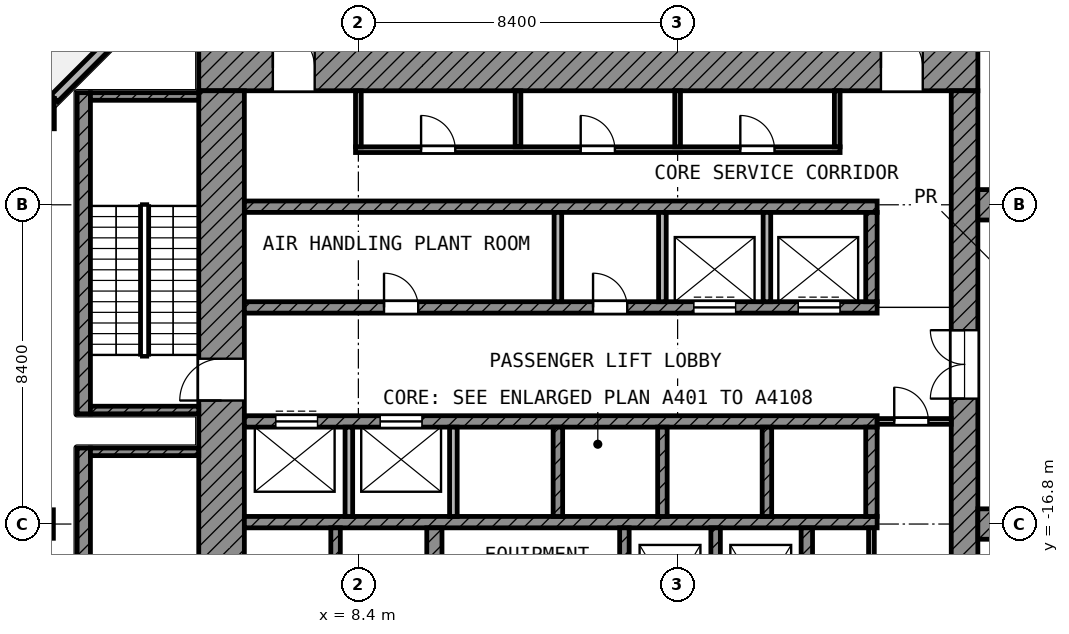
"""IFC4 building model, lengths in metres.
Left out: names, types, materials, properties, quantities, classifications, styles, units other than length and angle.
Written with IfcOpenShell. Run it as: python <this file> out.ifc"""

import sys

from ifc_helpers import new_model, si_unit, direction, frame, frame_2d, origin, origin_2d, place, context, subcontext, project, spatial, rectangle, extrude, element, fill, save


model = new_model("IFC4")
c1 = context("Model", 3, precision=1e-05, world=origin(), true_north=direction((0.0, 1.0)))
c2 = subcontext(c1, "Body", "Model", "MODEL_VIEW")
j1 = project(units=[si_unit("LENGTHUNIT", "METRE"), si_unit("PLANEANGLEUNIT", "RADIAN")], contexts=[c1])
p1 = place(None, origin())
s1 = spatial("IfcSite", under=j1, at=p1, CompositionType="ELEMENT")
p2 = place(p1, origin())
s2 = spatial("IfcBuilding", under=s1, at=p2, CompositionType="ELEMENT")
p3 = place(p2, frame((0.0, 0.0, 272.6)))
s3 = spatial("IfcBuildingStorey", under=s2, at=p3, CompositionType="ELEMENT", Elevation=272.6)
p4 = place(p3, frame((0.0, -6.0, 0.0), z_axis=(0.0, 0.0, 1.0), x_axis=(1.0, 0.0, 0.0)))
e1 = element("IfcColumn", 1, at=p4, inside=s3, PredefinedType="COLUMN", context=c2, shape_type="SweptSolid", body=[
    extrude(rectangle(XDim=0.8, YDim=0.8, at=origin_2d()), origin(), (0.0, 0.0, 1.0), 5.0),
])
p5 = place(p3, frame((0.0, -16.8, 0.0), z_axis=(0.0, 0.0, 1.0), x_axis=(1.0, 0.0, 0.0)))
e2 = element("IfcColumn", 2, at=p5, inside=s3, PredefinedType="COLUMN", context=c2, shape_type="SweptSolid", body=[
    extrude(rectangle(XDim=0.75, YDim=0.75, at=origin_2d()), origin(), (0.0, 0.0, 1.0), 5.0),
])
for number, where, z_axis, x_axis in (
    (3, (24.7, -8.4, 0.0), (0.0, 0.0, 1.0), (1.0, 0.0, 0.0)),
    (4, (24.7, -16.8, 0.0), (0.0, 0.0, 1.0), (1.0, 0.0, 0.0)),
):
    element("IfcWall", number, at=place(p3, frame(where, z_axis=z_axis, x_axis=x_axis)), inside=s3, PredefinedType="SHEAR", context=c2, shape_type="SweptSolid", body=[
        extrude(rectangle(XDim=8.5, YDim=0.8, at=frame_2d((4.25, 0.0))), origin(), (0.0, 0.0, 1.0), 4.4),
    ])
p6 = place(p3, frame((5.6, -0.4, 0.0), z_axis=(0.0, 0.0, 1.0), x_axis=(-0.707106781187, -0.707106781187, 0.0)))
e5 = element("IfcWall", 5, at=p6, inside=s3, PredefinedType="SOLIDWALL", context=c2, shape_type="SweptSolid", body=[
    extrude(rectangle(XDim=7.354, YDim=0.25, at=frame_2d((3.677, 0.0))), origin(), (0.0, 0.0, 1.0), 3.3),
])
p7 = place(p3, frame((4.2, -4.8, 0.0), z_axis=(0.0, 0.0, 1.0), x_axis=(1.0, 0.0, 0.0)))
e6 = element("IfcWall", 6, at=p7, inside=s3, PredefinedType="SHEAR", context=c2, shape_type="SweptSolid", body=[
    extrude(rectangle(XDim=20.5, YDim=1.2, at=frame_2d((10.25, 0.0))), origin(), (0.0, 0.0, 1.0), 4.4),
])
p8 = place(p7, frame((1.95, 0.0, 0.0)))
e7 = element("IfcOpeningElement", 7, at=p8, cuts=e6, PredefinedType="OPENING", context=c2, shape_type="SweptSolid", body=[
    extrude(rectangle(XDim=1.1, YDim=2.1, at=frame_2d((0.55, 1.05))), frame((0.0, 0.61, 0.0), z_axis=(0.0, -1.0, 0.0), x_axis=(1.0, 0.0, 0.0)), (0.0, 0.0, 1.0), 1.22),
])
p9 = place(p7, frame((17.95, 0.0, 0.0)))
e8 = element("IfcOpeningElement", 8, at=p9, cuts=e6, PredefinedType="OPENING", context=c2, shape_type="SweptSolid", body=[
    extrude(rectangle(XDim=1.1, YDim=2.1, at=frame_2d((0.55, 1.05))), frame((0.0, 0.61, 0.0), z_axis=(0.0, -1.0, 0.0), x_axis=(1.0, 0.0, 0.0)), (0.0, 0.0, 1.0), 1.22),
])
p10 = place(p3, frame((4.8, -24.7, 0.0), z_axis=(0.0, 0.0, 1.0), x_axis=(0.0, 1.0, 0.0)))
e9 = element("IfcWall", 9, at=p10, inside=s3, PredefinedType="SHEAR", context=c2, shape_type="SweptSolid", body=[
    extrude(rectangle(XDim=19.3, YDim=1.2, at=frame_2d((9.65, 0.0))), origin(), (0.0, 0.0, 1.0), 4.4),
])
p11 = place(p10, frame((11.15, 0.0, 0.0)))
e10 = element("IfcOpeningElement", 10, at=p11, cuts=e9, PredefinedType="OPENING", context=c2, shape_type="SweptSolid", body=[
    extrude(rectangle(XDim=1.1, YDim=2.1, at=frame_2d((0.55, 1.05))), frame((0.0, 0.61, 0.0), z_axis=(0.0, -1.0, 0.0), x_axis=(1.0, 0.0, 0.0)), (0.0, 0.0, 1.0), 1.22),
])
p12 = place(p10, frame((1.85, 0.0, 0.0)))
e11 = element("IfcOpeningElement", 11, at=p12, cuts=e9, PredefinedType="OPENING", context=c2, shape_type="SweptSolid", body=[
    extrude(rectangle(XDim=1.1, YDim=2.1, at=frame_2d((0.55, 1.05))), frame((0.0, 0.61, 0.0), z_axis=(0.0, -1.0, 0.0), x_axis=(1.0, 0.0, 0.0)), (0.0, 0.0, 1.0), 1.22),
])
p13 = place(p3, frame((24.35, -24.0, 0.0), z_axis=(0.0, 0.0, 1.0), x_axis=(0.0, 1.0, 0.0)))
e12 = element("IfcWall", 12, at=p13, inside=s3, PredefinedType="SHEAR", context=c2, shape_type="SweptSolid", body=[
    extrude(rectangle(XDim=18.6, YDim=0.7, at=frame_2d((9.3, 0.0))), origin(), (0.0, 0.0, 1.0), 4.4),
])
p14 = place(p13, frame((10.5, 0.0, 0.0)))
e13 = element("IfcOpeningElement", 13, at=p14, cuts=e12, PredefinedType="OPENING", context=c2, shape_type="SweptSolid", body=[
    extrude(rectangle(XDim=1.8, YDim=2.1, at=frame_2d((0.9, 1.05))), frame((0.0, 0.36, 0.0), z_axis=(0.0, -1.0, 0.0), x_axis=(1.0, 0.0, 0.0)), (0.0, 0.0, 1.0), 0.72),
])
p15 = place(p3, frame((5.4, -8.45, 0.0), z_axis=(0.0, 0.0, 1.0), x_axis=(1.0, 0.0, 0.0)))
e14 = element("IfcWall", 14, at=p15, inside=s3, PredefinedType="SHEAR", context=c2, shape_type="SweptSolid", body=[
    extrude(rectangle(XDim=16.65, YDim=0.3, at=frame_2d((8.325, 0.0))), origin(), (0.0, 0.0, 1.0), 4.4),
])
p16 = place(p3, frame((5.4, -11.1, 0.0), z_axis=(0.0, 0.0, 1.0), x_axis=(1.0, 0.0, 0.0)))
e15 = element("IfcWall", 15, at=p16, inside=s3, PredefinedType="SHEAR", context=c2, shape_type="SweptSolid", body=[
    extrude(rectangle(XDim=16.65, YDim=0.3, at=frame_2d((8.325, 0.0))), origin(), (0.0, 0.0, 1.0), 4.4),
])
p17 = place(p16, frame((11.825, 0.0, 0.0)))
e16 = element("IfcOpeningElement", 16, at=p17, cuts=e15, PredefinedType="OPENING", context=c2, shape_type="SweptSolid", body=[
    extrude(rectangle(XDim=1.1, YDim=2.1, at=frame_2d((0.55, 1.05))), frame((0.0, 0.16, 0.0), z_axis=(0.0, -1.0, 0.0), x_axis=(1.0, 0.0, 0.0)), (0.0, 0.0, 1.0), 0.32),
])
p18 = place(p16, frame((14.575, 0.0, 0.0)))
e17 = element("IfcOpeningElement", 17, at=p18, cuts=e15, PredefinedType="OPENING", context=c2, shape_type="SweptSolid", body=[
    extrude(rectangle(XDim=1.1, YDim=2.1, at=frame_2d((0.55, 1.05))), frame((0.0, 0.16, 0.0), z_axis=(0.0, -1.0, 0.0), x_axis=(1.0, 0.0, 0.0)), (0.0, 0.0, 1.0), 0.32),
])
p19 = place(p16, frame((3.675, 0.0, 0.0)))
e18 = element("IfcOpeningElement", 18, at=p19, cuts=e15, PredefinedType="OPENING", context=c2, shape_type="SweptSolid", body=[
    extrude(rectangle(XDim=0.9, YDim=2.1, at=frame_2d((0.45, 1.05))), frame((0.0, 0.16, 0.0), z_axis=(0.0, -1.0, 0.0), x_axis=(1.0, 0.0, 0.0)), (0.0, 0.0, 1.0), 0.32),
])
p20 = place(p16, frame((9.175, 0.0, 0.0)))
e19 = element("IfcOpeningElement", 19, at=p20, cuts=e15, PredefinedType="OPENING", context=c2, shape_type="SweptSolid", body=[
    extrude(rectangle(XDim=0.9, YDim=2.1, at=frame_2d((0.45, 1.05))), frame((0.0, 0.16, 0.0), z_axis=(0.0, -1.0, 0.0), x_axis=(1.0, 0.0, 0.0)), (0.0, 0.0, 1.0), 0.32),
])
p21 = place(p3, frame((5.4, -14.1, 0.0), z_axis=(0.0, 0.0, 1.0), x_axis=(1.0, 0.0, 0.0)))
e20 = element("IfcWall", 20, at=p21, inside=s3, PredefinedType="SHEAR", context=c2, shape_type="SweptSolid", body=[
    extrude(rectangle(XDim=16.65, YDim=0.3, at=frame_2d((8.325, 0.0))), origin(), (0.0, 0.0, 1.0), 4.4),
])
p22 = place(p21, frame((0.825, 0.0, 0.0)))
e21 = element("IfcOpeningElement", 21, at=p22, cuts=e20, PredefinedType="OPENING", context=c2, shape_type="SweptSolid", body=[
    extrude(rectangle(XDim=1.1, YDim=2.1, at=frame_2d((0.55, 1.05))), frame((0.0, 0.16, 0.0), z_axis=(0.0, -1.0, 0.0), x_axis=(1.0, 0.0, 0.0)), (0.0, 0.0, 1.0), 0.32),
])
p23 = place(p21, frame((3.575, 0.0, 0.0)))
e22 = element("IfcOpeningElement", 22, at=p23, cuts=e20, PredefinedType="OPENING", context=c2, shape_type="SweptSolid", body=[
    extrude(rectangle(XDim=1.1, YDim=2.1, at=frame_2d((0.55, 1.05))), frame((0.0, 0.16, 0.0), z_axis=(0.0, -1.0, 0.0), x_axis=(1.0, 0.0, 0.0)), (0.0, 0.0, 1.0), 0.32),
])
p24 = place(p3, frame((5.4, -16.75, 0.0), z_axis=(0.0, 0.0, 1.0), x_axis=(1.0, 0.0, 0.0)))
e23 = element("IfcWall", 23, at=p24, inside=s3, PredefinedType="SHEAR", context=c2, shape_type="SweptSolid", body=[
    extrude(rectangle(XDim=16.65, YDim=0.3, at=frame_2d((8.325, 0.0))), origin(), (0.0, 0.0, 1.0), 4.4),
])
p25 = place(p3, frame((10.4, -20.05, 0.0), z_axis=(0.0, 0.0, 1.0), x_axis=(0.0, 1.0, 0.0)))
e24 = element("IfcWall", 24, at=p25, inside=s3, PredefinedType="SHEAR", context=c2, shape_type="SweptSolid", body=[
    extrude(rectangle(XDim=3.15, YDim=0.4, at=frame_2d((1.575, 0.0))), origin(), (0.0, 0.0, 1.0), 4.4),
])
p26 = place(p3, frame((20.2, -20.35, 0.0), z_axis=(0.0, 0.0, 1.0), x_axis=(0.0, 1.0, 0.0)))
e25 = element("IfcWall", 25, at=p26, inside=s3, PredefinedType="SHEAR", context=c2, shape_type="SweptSolid", body=[
    extrude(rectangle(XDim=3.45, YDim=0.3, at=frame_2d((1.725, 0.0))), origin(), (0.0, 0.0, 1.0), 4.4),
])
p27 = place(p3, frame((21.9, -10.95, 0.0), z_axis=(0.0, 0.0, 1.0), x_axis=(0.0, 1.0, 0.0)))
e26 = element("IfcWall", 26, at=p27, inside=s3, PredefinedType="SHEAR", context=c2, shape_type="SweptSolid", body=[
    extrude(rectangle(XDim=2.35, YDim=0.3, at=frame_2d((1.175, 0.0))), origin(), (0.0, 0.0, 1.0), 4.4),
])
p28 = place(p3, frame((21.9, -16.6, 0.0), z_axis=(0.0, 0.0, 1.0), x_axis=(0.0, 1.0, 0.0)))
e27 = element("IfcWall", 27, at=p28, inside=s3, PredefinedType="SHEAR", context=c2, shape_type="SweptSolid", body=[
    extrude(rectangle(XDim=2.35, YDim=0.3, at=frame_2d((1.175, 0.0))), origin(), (0.0, 0.0, 1.0), 4.4),
])
for number, where, z_axis, x_axis in (
    (28, (7.8, -20.05, 0.0), (0.0, 0.0, 1.0), (0.0, 1.0, 0.0)),
    (29, (15.4, -20.05, 0.0), (0.0, 0.0, 1.0), (0.0, 1.0, 0.0)),
    (30, (17.8, -20.05, 0.0), (0.0, 0.0, 1.0), (0.0, 1.0, 0.0)),
):
    element("IfcWall", number, at=place(p3, frame(where, z_axis=z_axis, x_axis=x_axis)), inside=s3, PredefinedType="SHEAR", context=c2, shape_type="SweptSolid", body=[
        extrude(rectangle(XDim=3.15, YDim=0.25, at=frame_2d((1.575, 0.0))), origin(), (0.0, 0.0, 1.0), 4.4),
    ])
for number, where, z_axis, x_axis in (
    (31, (13.65, -10.95, 0.0), (0.0, 0.0, 1.0), (0.0, 1.0, 0.0)),
    (32, (16.4, -10.95, 0.0), (0.0, 0.0, 1.0), (0.0, 1.0, 0.0)),
    (33, (19.15, -10.95, 0.0), (0.0, 0.0, 1.0), (0.0, 1.0, 0.0)),
):
    element("IfcWall", number, at=place(p3, frame(where, z_axis=z_axis, x_axis=x_axis)), inside=s3, PredefinedType="PARTITIONING", context=c2, shape_type="SweptSolid", body=[
        extrude(rectangle(XDim=2.35, YDim=0.2, at=frame_2d((1.175, 0.0))), origin(), (0.0, 0.0, 1.0), 4.4),
    ])
for number, where, z_axis, x_axis in (
    (34, (8.15, -16.6, 0.0), (0.0, 0.0, 1.0), (0.0, 1.0, 0.0)),
    (35, (10.9, -16.6, 0.0), (0.0, 0.0, 1.0), (0.0, 1.0, 0.0)),
):
    element("IfcWall", number, at=place(p3, frame(where, z_axis=z_axis, x_axis=x_axis)), inside=s3, PredefinedType="PARTITIONING", context=c2, shape_type="SweptSolid", body=[
        extrude(rectangle(XDim=2.35, YDim=0.2, at=frame_2d((1.175, 0.0))), origin(), (0.0, 0.0, 1.0), 4.4),
    ])
for number, where, z_axis, x_axis in (
    (36, (13.65, -16.6, 0.0), (0.0, 0.0, 1.0), (0.0, 1.0, 0.0)),
    (37, (16.4, -16.6, 0.0), (0.0, 0.0, 1.0), (0.0, 1.0, 0.0)),
    (38, (19.15, -16.6, 0.0), (0.0, 0.0, 1.0), (0.0, 1.0, 0.0)),
):
    element("IfcWall", number, at=place(p3, frame(where, z_axis=z_axis, x_axis=x_axis)), inside=s3, PredefinedType="SHEAR", context=c2, shape_type="SweptSolid", body=[
        extrude(rectangle(XDim=2.35, YDim=0.25, at=frame_2d((1.175, 0.0))), origin(), (0.0, 0.0, 1.0), 4.4),
    ])
p29 = place(p3, frame((21.9, -19.05, 0.0), z_axis=(0.0, 0.0, 1.0), x_axis=(0.0, 1.0, 0.0)))
e39 = element("IfcWall", 39, at=p29, inside=s3, PredefinedType="PARTITIONING", context=c2, shape_type="SweptSolid", body=[
    extrude(rectangle(XDim=2.15, YDim=0.15, at=frame_2d((1.075, 0.0))), origin(), (0.0, 0.0, 1.0), 4.4),
])
p30 = place(p3, frame((22.05, -14.1, 0.0), z_axis=(0.0, 0.0, 1.0), x_axis=(1.0, 0.0, 0.0)))
e40 = element("IfcWall", 40, at=p30, inside=s3, PredefinedType="PARTITIONING", context=c2, shape_type="SweptSolid", body=[
    extrude(rectangle(XDim=1.95, YDim=0.15, at=frame_2d((0.975, 0.0))), origin(), (0.0, 0.0, 1.0), 4.4),
])
p31 = place(p30, frame((0.45, 0.0, 0.0)))
e41 = element("IfcOpeningElement", 41, at=p31, cuts=e40, PredefinedType="OPENING", context=c2, shape_type="SweptSolid", body=[
    extrude(rectangle(XDim=0.9, YDim=2.1, at=frame_2d((0.45, 1.05))), frame((0.0, 0.085, 0.0), z_axis=(0.0, -1.0, 0.0), x_axis=(1.0, 0.0, 0.0)), (0.0, 0.0, 1.0), 0.17),
])
p32 = place(p3, frame((8.325, -6.95, 0.0), z_axis=(0.0, 0.0, 1.0), x_axis=(1.0, 0.0, 0.0)))
e42 = element("IfcWall", 42, at=p32, inside=s3, PredefinedType="PARTITIONING", context=c2, shape_type="SweptSolid", body=[
    extrude(rectangle(XDim=12.75, YDim=0.15, at=frame_2d((6.375, 0.0))), origin(), (0.0, 0.0, 1.0), 4.4),
])
p33 = place(p32, frame((1.725, 0.0, 0.0)))
e43 = element("IfcOpeningElement", 43, at=p33, cuts=e42, PredefinedType="OPENING", context=c2, shape_type="SweptSolid", body=[
    extrude(rectangle(XDim=0.9, YDim=2.1, at=frame_2d((0.45, 1.05))), frame((0.0, 0.085, 0.0), z_axis=(0.0, -1.0, 0.0), x_axis=(1.0, 0.0, 0.0)), (0.0, 0.0, 1.0), 0.17),
])
p34 = place(p32, frame((5.925, 0.0, 0.0)))
e44 = element("IfcOpeningElement", 44, at=p34, cuts=e42, PredefinedType="OPENING", context=c2, shape_type="SweptSolid", body=[
    extrude(rectangle(XDim=0.9, YDim=2.1, at=frame_2d((0.45, 1.05))), frame((0.0, 0.085, 0.0), z_axis=(0.0, -1.0, 0.0), x_axis=(1.0, 0.0, 0.0)), (0.0, 0.0, 1.0), 0.17),
])
p35 = place(p32, frame((10.125, 0.0, 0.0)))
e45 = element("IfcOpeningElement", 45, at=p35, cuts=e42, PredefinedType="OPENING", context=c2, shape_type="SweptSolid", body=[
    extrude(rectangle(XDim=0.9, YDim=2.1, at=frame_2d((0.45, 1.05))), frame((0.0, 0.085, 0.0), z_axis=(0.0, -1.0, 0.0), x_axis=(1.0, 0.0, 0.0)), (0.0, 0.0, 1.0), 0.17),
])
for number, where, z_axis, x_axis in (
    (46, (8.4, -6.875, 0.0), (0.0, 0.0, 1.0), (0.0, 1.0, 0.0)),
    (47, (12.6, -6.875, 0.0), (0.0, 0.0, 1.0), (0.0, 1.0, 0.0)),
    (48, (16.8, -6.875, 0.0), (0.0, 0.0, 1.0), (0.0, 1.0, 0.0)),
    (49, (21.0, -6.875, 0.0), (0.0, 0.0, 1.0), (0.0, 1.0, 0.0)),
):
    element("IfcWall", number, at=place(p3, frame(where, z_axis=z_axis, x_axis=x_axis)), inside=s3, PredefinedType="PARTITIONING", context=c2, shape_type="SweptSolid", body=[
        extrude(rectangle(XDim=1.475, YDim=0.15, at=frame_2d((0.738, 0.0))), origin(), (0.0, 0.0, 1.0), 4.4),
    ])
p36 = place(p3, frame((1.175, -13.9, 0.0), z_axis=(0.0, 0.0, 1.0), x_axis=(0.0, 1.0, 0.0)))
e50 = element("IfcWall", 50, at=p36, inside=s3, PredefinedType="SHEAR", context=c2, shape_type="SweptSolid", body=[
    extrude(rectangle(XDim=8.45, YDim=0.35, at=frame_2d((4.225, 0.0))), origin(), (0.0, 0.0, 1.0), 4.4),
])
for number, where, z_axis, x_axis in (
    (51, (1.35, -5.55, 0.0), (0.0, 0.0, 1.0), (1.0, 0.0, 0.0)),
    (52, (1.35, -13.8, 0.0), (0.0, 0.0, 1.0), (1.0, 0.0, 0.0)),
):
    element("IfcWall", number, at=place(p3, frame(where, z_axis=z_axis, x_axis=x_axis)), inside=s3, PredefinedType="SHEAR", context=c2, shape_type="SweptSolid", body=[
        extrude(rectangle(XDim=2.85, YDim=0.2, at=frame_2d((1.425, 0.0))), origin(), (0.0, 0.0, 1.0), 4.4),
    ])
p37 = place(p3, frame((1.175, -23.25, 0.0), z_axis=(0.0, 0.0, 1.0), x_axis=(0.0, 1.0, 0.0)))
e53 = element("IfcWall", 53, at=p37, inside=s3, PredefinedType="SHEAR", context=c2, shape_type="SweptSolid", body=[
    extrude(rectangle(XDim=8.45, YDim=0.35, at=frame_2d((4.225, 0.0))), origin(), (0.0, 0.0, 1.0), 4.4),
])
p38 = place(p3, frame((1.35, -14.9, 0.0), z_axis=(0.0, 0.0, 1.0), x_axis=(1.0, 0.0, 0.0)))
e54 = element("IfcWall", 54, at=p38, inside=s3, PredefinedType="SHEAR", context=c2, shape_type="SweptSolid", body=[
    extrude(rectangle(XDim=2.85, YDim=0.2, at=frame_2d((1.425, 0.0))), origin(), (0.0, 0.0, 1.0), 4.4),
])
p39 = place(p17, origin())
e55 = element("IfcDoor", 55, at=p39, inside=s3, OperationType="DOUBLE_DOOR_SLIDING", PredefinedType="DOOR", context=c2, shape_type="SweptSolid", body=[
    extrude(rectangle(XDim=1.1, YDim=2.1, at=frame_2d((0.55, 1.05))), frame((0.0, 0.025, 0.0), z_axis=(0.0, -1.0, 0.0), x_axis=(1.0, 0.0, 0.0)), (0.0, 0.0, 1.0), 0.05),
])
fill(e16, e55)
p40 = place(p18, origin())
e56 = element("IfcDoor", 56, at=p40, inside=s3, OperationType="DOUBLE_DOOR_SLIDING", PredefinedType="DOOR", context=c2, shape_type="SweptSolid", body=[
    extrude(rectangle(XDim=1.1, YDim=2.1, at=frame_2d((0.55, 1.05))), frame((0.0, 0.025, 0.0), z_axis=(0.0, -1.0, 0.0), x_axis=(1.0, 0.0, 0.0)), (0.0, 0.0, 1.0), 0.05),
])
fill(e17, e56)
p41 = place(p22, origin())
e57 = element("IfcDoor", 57, at=p41, inside=s3, OperationType="DOUBLE_DOOR_SLIDING", PredefinedType="DOOR", context=c2, shape_type="SweptSolid", body=[
    extrude(rectangle(XDim=1.1, YDim=2.1, at=frame_2d((0.55, 1.05))), frame((0.0, 0.025, 0.0), z_axis=(0.0, -1.0, 0.0), x_axis=(1.0, 0.0, 0.0)), (0.0, 0.0, 1.0), 0.05),
])
fill(e21, e57)
p42 = place(p23, origin())
e58 = element("IfcDoor", 58, at=p42, inside=s3, OperationType="DOUBLE_DOOR_SLIDING", PredefinedType="DOOR", context=c2, shape_type="SweptSolid", body=[
    extrude(rectangle(XDim=1.1, YDim=2.1, at=frame_2d((0.55, 1.05))), frame((0.0, 0.025, 0.0), z_axis=(0.0, -1.0, 0.0), x_axis=(1.0, 0.0, 0.0)), (0.0, 0.0, 1.0), 0.05),
])
fill(e22, e58)
p43 = place(p11, origin())
e59 = element("IfcDoor", 59, at=p43, inside=s3, OperationType="SINGLE_SWING_LEFT", PredefinedType="DOOR", context=c2, shape_type="SweptSolid", body=[
    extrude(rectangle(XDim=1.1, YDim=2.1, at=frame_2d((0.55, 1.05))), frame((0.0, 0.025, 0.0), z_axis=(0.0, -1.0, 0.0), x_axis=(1.0, 0.0, 0.0)), (0.0, 0.0, 1.0), 0.05),
])
fill(e10, e59)
p44 = place(p8, origin())
e60 = element("IfcDoor", 60, at=p44, inside=s3, OperationType="SINGLE_SWING_LEFT", PredefinedType="DOOR", context=c2, shape_type="SweptSolid", body=[
    extrude(rectangle(XDim=1.1, YDim=2.1, at=frame_2d((0.55, 1.05))), frame((0.0, 0.025, 0.0), z_axis=(0.0, -1.0, 0.0), x_axis=(1.0, 0.0, 0.0)), (0.0, 0.0, 1.0), 0.05),
])
fill(e7, e60)
p45 = place(p9, origin())
e61 = element("IfcDoor", 61, at=p45, inside=s3, OperationType="SINGLE_SWING_LEFT", PredefinedType="DOOR", context=c2, shape_type="SweptSolid", body=[
    extrude(rectangle(XDim=1.1, YDim=2.1, at=frame_2d((0.55, 1.05))), frame((0.0, 0.025, 0.0), z_axis=(0.0, -1.0, 0.0), x_axis=(1.0, 0.0, 0.0)), (0.0, 0.0, 1.0), 0.05),
])
fill(e8, e61)
p46 = place(p14, origin())
e62 = element("IfcDoor", 62, at=p46, inside=s3, OperationType="DOUBLE_DOOR_SINGLE_SWING", PredefinedType="DOOR", context=c2, shape_type="SweptSolid", body=[
    extrude(rectangle(XDim=1.8, YDim=2.1, at=frame_2d((0.9, 1.05))), frame((0.0, 0.025, 0.0), z_axis=(0.0, -1.0, 0.0), x_axis=(1.0, 0.0, 0.0)), (0.0, 0.0, 1.0), 0.05),
])
fill(e13, e62)
p47 = place(p33, origin())
e63 = element("IfcDoor", 63, at=p47, inside=s3, OperationType="SINGLE_SWING_LEFT", PredefinedType="DOOR", context=c2, shape_type="SweptSolid", body=[
    extrude(rectangle(XDim=0.9, YDim=2.1, at=frame_2d((0.45, 1.05))), frame((0.0, 0.025, 0.0), z_axis=(0.0, -1.0, 0.0), x_axis=(1.0, 0.0, 0.0)), (0.0, 0.0, 1.0), 0.05),
])
fill(e43, e63)
p48 = place(p34, origin())
e64 = element("IfcDoor", 64, at=p48, inside=s3, OperationType="SINGLE_SWING_LEFT", PredefinedType="DOOR", context=c2, shape_type="SweptSolid", body=[
    extrude(rectangle(XDim=0.9, YDim=2.1, at=frame_2d((0.45, 1.05))), frame((0.0, 0.025, 0.0), z_axis=(0.0, -1.0, 0.0), x_axis=(1.0, 0.0, 0.0)), (0.0, 0.0, 1.0), 0.05),
])
fill(e44, e64)
p49 = place(p35, origin())
e65 = element("IfcDoor", 65, at=p49, inside=s3, OperationType="SINGLE_SWING_LEFT", PredefinedType="DOOR", context=c2, shape_type="SweptSolid", body=[
    extrude(rectangle(XDim=0.9, YDim=2.1, at=frame_2d((0.45, 1.05))), frame((0.0, 0.025, 0.0), z_axis=(0.0, -1.0, 0.0), x_axis=(1.0, 0.0, 0.0)), (0.0, 0.0, 1.0), 0.05),
])
fill(e45, e65)
p50 = place(p31, origin())
e66 = element("IfcDoor", 66, at=p50, inside=s3, OperationType="SINGLE_SWING_LEFT", PredefinedType="DOOR", context=c2, shape_type="SweptSolid", body=[
    extrude(rectangle(XDim=0.9, YDim=2.1, at=frame_2d((0.45, 1.05))), frame((0.0, 0.025, 0.0), z_axis=(0.0, -1.0, 0.0), x_axis=(1.0, 0.0, 0.0)), (0.0, 0.0, 1.0), 0.05),
])
fill(e41, e66)
p51 = place(p19, origin())
e67 = element("IfcDoor", 67, at=p51, inside=s3, OperationType="SINGLE_SWING_LEFT", PredefinedType="DOOR", context=c2, shape_type="SweptSolid", body=[
    extrude(rectangle(XDim=0.9, YDim=2.1, at=frame_2d((0.45, 1.05))), frame((0.0, 0.025, 0.0), z_axis=(0.0, -1.0, 0.0), x_axis=(1.0, 0.0, 0.0)), (0.0, 0.0, 1.0), 0.05),
])
fill(e18, e67)
p52 = place(p20, origin())
e68 = element("IfcDoor", 68, at=p52, inside=s3, OperationType="SINGLE_SWING_LEFT", PredefinedType="DOOR", context=c2, shape_type="SweptSolid", body=[
    extrude(rectangle(XDim=0.9, YDim=2.1, at=frame_2d((0.45, 1.05))), frame((0.0, 0.025, 0.0), z_axis=(0.0, -1.0, 0.0), x_axis=(1.0, 0.0, 0.0)), (0.0, 0.0, 1.0), 0.05),
])
fill(e19, e68)
save(model, sys.argv[1])
